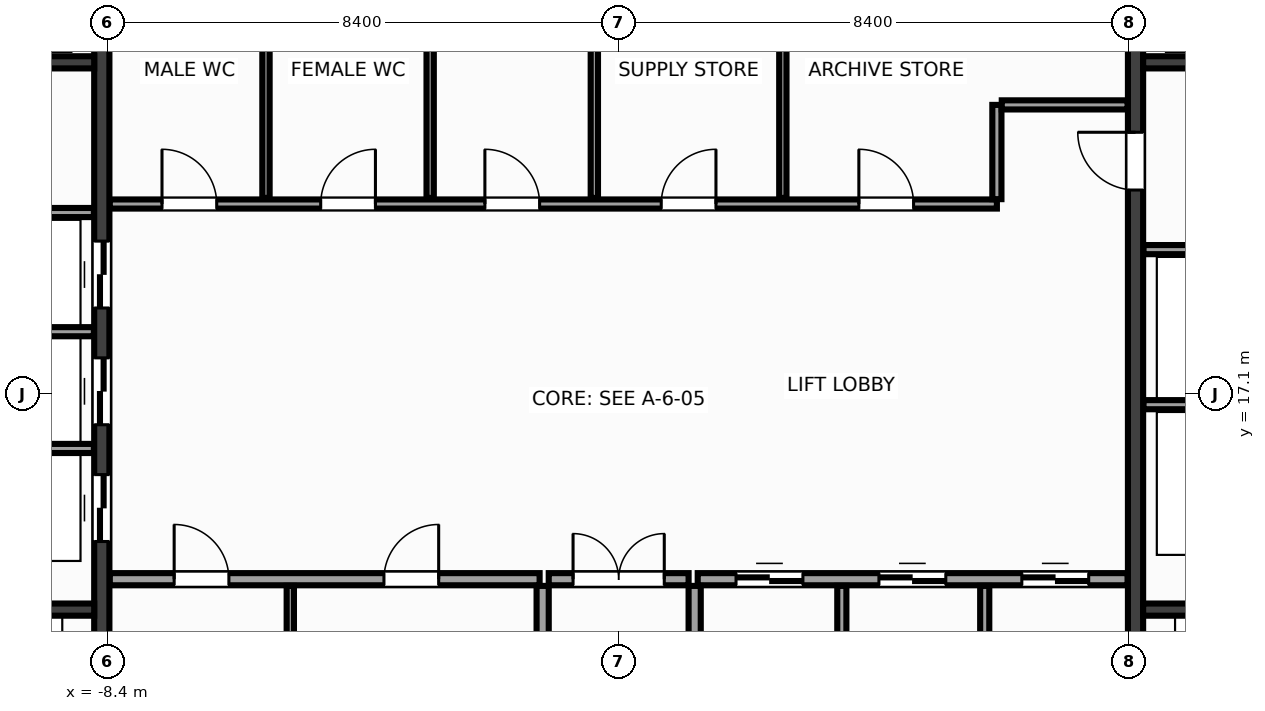
"""IFC4 building model, lengths in metres.
Left out: names, types, materials, properties, quantities, classifications, styles, units other than length and angle.
Written with IfcOpenShell. Run it as: python <this file> out.ifc"""

import sys

from ifc_helpers import new_model, si_unit, direction, frame, frame_2d, origin, place, context, subcontext, project, spatial, rectangle, extrude, source, transform, mapped, element, fill, save


model = new_model("IFC4")
c1 = context("Model", 3, precision=1e-05, world=origin(), true_north=direction((0.0, 1.0)))
c2 = subcontext(c1, "Body", "Model", "MODEL_VIEW")
j1 = project(units=[si_unit("LENGTHUNIT", "METRE"), si_unit("PLANEANGLEUNIT", "RADIAN")], contexts=[c1])
p1 = place(None, origin())
s1 = spatial("IfcSite", under=j1, at=p1, CompositionType="ELEMENT")
p2 = place(p1, origin())
s2 = spatial("IfcBuilding", under=s1, at=p2, CompositionType="ELEMENT")
p3 = place(p2, frame((0.0, 0.0, 142.4)))
s3 = spatial("IfcBuildingStorey", under=s2, at=p3, CompositionType="ELEMENT", Elevation=142.4)
m1 = source(origin(), c2, "Body", "SweptSolid", [
    extrude(rectangle(XDim=12.95, YDim=0.25, at=frame_2d((6.475, 0.0))), origin(), (0.0, 0.0, 1.0), 3.6),
])
p4 = place(p3, frame((-8.5, 10.525, 0.0), z_axis=(0.0, 0.0, 1.0), x_axis=(0.0, 1.0, 0.0)))
e1 = element("IfcWall", 1, at=p4, inside=s3, PredefinedType="SHEAR", context=c2, shape_type="MappedRepresentation", body=[
    mapped(m1, transform((0.0, 0.0, 0.0), x_axis=(1.0, 0.0, 0.0), y_axis=(0.0, 1.0, 0.0), z_axis=(0.0, 0.0, 1.0), scale=1.0)),
])
p5 = place(p4, frame((4.145, 0.0, 0.0)))
e2 = element("IfcOpeningElement", 2, at=p5, cuts=e1, PredefinedType="OPENING", context=c2, shape_type="SweptSolid", body=[
    extrude(rectangle(XDim=1.1, YDim=2.15, at=frame_2d((0.55, 1.075))), frame((0.0, 0.137, 0.0), z_axis=(0.0, -1.0, 0.0), x_axis=(1.0, 0.0, 0.0)), (0.0, 0.0, 1.0), 0.274),
])
p6 = place(p4, frame((6.065, 0.0, 0.0)))
e3 = element("IfcOpeningElement", 3, at=p6, cuts=e1, PredefinedType="OPENING", context=c2, shape_type="SweptSolid", body=[
    extrude(rectangle(XDim=1.1, YDim=2.15, at=frame_2d((0.55, 1.075))), frame((0.0, 0.137, 0.0), z_axis=(0.0, -1.0, 0.0), x_axis=(1.0, 0.0, 0.0)), (0.0, 0.0, 1.0), 0.274),
])
p7 = place(p4, frame((7.985, 0.0, 0.0)))
e4 = element("IfcOpeningElement", 4, at=p7, cuts=e1, PredefinedType="OPENING", context=c2, shape_type="SweptSolid", body=[
    extrude(rectangle(XDim=1.1, YDim=2.15, at=frame_2d((0.55, 1.075))), frame((0.0, 0.137, 0.0), z_axis=(0.0, -1.0, 0.0), x_axis=(1.0, 0.0, 0.0)), (0.0, 0.0, 1.0), 0.274),
])
p8 = place(p3, frame((8.5, 10.525, 0.0), z_axis=(0.0, 0.0, 1.0), x_axis=(0.0, 1.0, 0.0)))
e5 = element("IfcWall", 5, at=p8, inside=s3, PredefinedType="SHEAR", context=c2, shape_type="MappedRepresentation", body=[
    mapped(m1, transform((0.0, 0.0, 0.0), x_axis=(1.0, 0.0, 0.0), y_axis=(0.0, 1.0, 0.0), z_axis=(0.0, 0.0, 1.0), scale=1.0)),
])
p9 = place(p8, frame((9.925, 0.0, 0.0)))
e6 = element("IfcOpeningElement", 6, at=p9, cuts=e5, PredefinedType="OPENING", context=c2, shape_type="SweptSolid", body=[
    extrude(rectangle(XDim=0.95, YDim=2.15, at=frame_2d((0.475, 1.075))), frame((0.0, 0.137, 0.0), z_axis=(0.0, -1.0, 0.0), x_axis=(1.0, 0.0, 0.0)), (0.0, 0.0, 1.0), 0.274),
])
m2 = source(origin(), c2, "Body", "SweptSolid", [
    extrude(rectangle(XDim=2.825, YDim=0.2, at=frame_2d((1.413, 0.0))), origin(), (0.0, 0.0, 1.0), 3.6),
])
for number, where, z_axis, x_axis in (
    (7, (-11.45, 13.55, 0.0), (0.0, 0.0, 1.0), (1.0, 0.0, 0.0)),
    (8, (8.625, 13.55, 0.0), (0.0, 0.0, 1.0), (1.0, 0.0, 0.0)),
):
    element("IfcWall", number, at=place(p3, frame(where, z_axis=z_axis, x_axis=x_axis)), inside=s3, PredefinedType="SHEAR", context=c2, shape_type="MappedRepresentation", body=[
        mapped(m2, transform((0.0, 0.0, 0.0), x_axis=(1.0, 0.0, 0.0), y_axis=(0.0, 1.0, 0.0), z_axis=(0.0, 0.0, 1.0), scale=1.0)),
    ])
m3 = source(origin(), c2, "Body", "SweptSolid", [
    extrude(rectangle(XDim=3.02, YDim=0.2, at=frame_2d((1.51, 0.0))), origin(), (0.0, 0.0, 1.0), 3.6),
])
for number, where, z_axis, x_axis in (
    (9, (-11.645, 22.55, 0.0), (0.0, 0.0, 1.0), (1.0, 0.0, 0.0)),
    (10, (8.625, 22.55, 0.0), (0.0, 0.0, 1.0), (1.0, 0.0, 0.0)),
):
    element("IfcWall", number, at=place(p3, frame(where, z_axis=z_axis, x_axis=x_axis)), inside=s3, PredefinedType="SHEAR", context=c2, shape_type="MappedRepresentation", body=[
        mapped(m3, transform((0.0, 0.0, 0.0), x_axis=(1.0, 0.0, 0.0), y_axis=(0.0, 1.0, 0.0), z_axis=(0.0, 0.0, 1.0), scale=1.0)),
    ])
m4 = source(origin(), c2, "Body", "SweptSolid", [
    extrude(rectangle(XDim=3.01, YDim=0.15, at=frame_2d((1.505, 0.0))), origin(), (0.0, 0.0, 1.0), 3.38),
])
for number, where, z_axis, x_axis in (
    (11, (-11.64, 16.2, 0.0), (0.0, 0.0, 1.0), (1.0, 0.0, 0.0)),
    (12, (-11.64, 18.12, 0.0), (0.0, 0.0, 1.0), (1.0, 0.0, 0.0)),
    (13, (-11.64, 20.08, 0.0), (0.0, 0.0, 1.0), (1.0, 0.0, 0.0)),
    (14, (8.63, 16.92, 0.0), (0.0, 0.0, 1.0), (1.0, 0.0, 0.0)),
    (15, (8.63, 19.47, 0.0), (0.0, 0.0, 1.0), (1.0, 0.0, 0.0)),
):
    element("IfcWall", number, at=place(p3, frame(where, z_axis=z_axis, x_axis=x_axis)), inside=s3, PredefinedType="PARTITIONING", context=c2, shape_type="MappedRepresentation", body=[
        mapped(m4, transform((0.0, 0.0, 0.0), x_axis=(1.0, 0.0, 0.0), y_axis=(0.0, 1.0, 0.0), z_axis=(0.0, 0.0, 1.0), scale=1.0)),
    ])
m5 = source(origin(), c2, "Body", "SweptSolid", [
    extrude(rectangle(XDim=7.07, YDim=0.2, at=frame_2d((3.535, 0.0))), origin(), (0.0, 0.0, 1.0), 3.38),
])
p10 = place(p3, frame((-8.37, 14.05, 0.0), z_axis=(0.0, 0.0, 1.0), x_axis=(1.0, 0.0, 0.0)))
e16 = element("IfcWall", 16, at=p10, inside=s3, PredefinedType="PARTITIONING", context=c2, shape_type="MappedRepresentation", body=[
    mapped(m5, transform((0.0, 0.0, 0.0), x_axis=(1.0, 0.0, 0.0), y_axis=(0.0, 1.0, 0.0), z_axis=(0.0, 0.0, 1.0), scale=1.0)),
])
p11 = place(p10, frame((1.06, 0.0, 0.0)))
e17 = element("IfcOpeningElement", 17, at=p11, cuts=e16, PredefinedType="OPENING", context=c2, shape_type="SweptSolid", body=[
    extrude(rectangle(XDim=0.9, YDim=2.15, at=frame_2d((0.45, 1.075))), frame((0.0, 0.112, 0.0), z_axis=(0.0, -1.0, 0.0), x_axis=(1.0, 0.0, 0.0)), (0.0, 0.0, 1.0), 0.224),
])
p12 = place(p10, frame((4.51, 0.0, 0.0)))
e18 = element("IfcOpeningElement", 18, at=p12, cuts=e16, PredefinedType="OPENING", context=c2, shape_type="SweptSolid", body=[
    extrude(rectangle(XDim=0.9, YDim=2.15, at=frame_2d((0.45, 1.075))), frame((0.0, 0.112, 0.0), z_axis=(0.0, -1.0, 0.0), x_axis=(1.0, 0.0, 0.0)), (0.0, 0.0, 1.0), 0.224),
])
p13 = place(p3, frame((1.3, 14.05, 0.0), z_axis=(0.0, 0.0, 1.0), x_axis=(1.0, 0.0, 0.0)))
e19 = element("IfcWall", 19, at=p13, inside=s3, PredefinedType="PARTITIONING", context=c2, shape_type="MappedRepresentation", body=[
    mapped(m5, transform((0.0, 0.0, 0.0), x_axis=(1.0, 0.0, 0.0), y_axis=(0.0, 1.0, 0.0), z_axis=(0.0, 0.0, 1.0), scale=1.0)),
])
p14 = place(p13, frame((0.63, 0.0, 0.0)))
e20 = element("IfcOpeningElement", 20, at=p14, cuts=e19, PredefinedType="OPENING", context=c2, shape_type="SweptSolid", body=[
    extrude(rectangle(XDim=1.1, YDim=2.15, at=frame_2d((0.55, 1.075))), frame((0.0, 0.112, 0.0), z_axis=(0.0, -1.0, 0.0), x_axis=(1.0, 0.0, 0.0)), (0.0, 0.0, 1.0), 0.224),
])
p15 = place(p13, frame((2.98, 0.0, 0.0)))
e21 = element("IfcOpeningElement", 21, at=p15, cuts=e19, PredefinedType="OPENING", context=c2, shape_type="SweptSolid", body=[
    extrude(rectangle(XDim=1.1, YDim=2.15, at=frame_2d((0.55, 1.075))), frame((0.0, 0.112, 0.0), z_axis=(0.0, -1.0, 0.0), x_axis=(1.0, 0.0, 0.0)), (0.0, 0.0, 1.0), 0.224),
])
p16 = place(p13, frame((5.33, 0.0, 0.0)))
e22 = element("IfcOpeningElement", 22, at=p16, cuts=e19, PredefinedType="OPENING", context=c2, shape_type="SweptSolid", body=[
    extrude(rectangle(XDim=1.1, YDim=2.15, at=frame_2d((0.55, 1.075))), frame((0.0, 0.112, 0.0), z_axis=(0.0, -1.0, 0.0), x_axis=(1.0, 0.0, 0.0)), (0.0, 0.0, 1.0), 0.224),
])
m6 = source(origin(), c2, "Body", "SweptSolid", [
    extrude(rectangle(XDim=3.415, YDim=0.2, at=frame_2d((1.708, 0.0))), origin(), (0.0, 0.0, 1.0), 3.38),
])
for number, where, z_axis, x_axis in (
    (23, (-1.25, 10.525, 0.0), (0.0, 0.0, 1.0), (0.0, 1.0, 0.0)),
    (24, (1.25, 10.525, 0.0), (0.0, 0.0, 1.0), (0.0, 1.0, 0.0)),
):
    element("IfcWall", number, at=place(p3, frame(where, z_axis=z_axis, x_axis=x_axis)), inside=s3, PredefinedType="PARTITIONING", context=c2, shape_type="MappedRepresentation", body=[
        mapped(m6, transform((0.0, 0.0, 0.0), x_axis=(1.0, 0.0, 0.0), y_axis=(0.0, 1.0, 0.0), z_axis=(0.0, 0.0, 1.0), scale=1.0)),
    ])
m7 = source(origin(), c2, "Body", "SweptSolid", [
    extrude(rectangle(XDim=2.3, YDim=0.2, at=frame_2d((1.15, 0.0))), origin(), (0.0, 0.0, 1.0), 3.38),
])
p17 = place(p3, frame((-1.15, 14.05, 0.0), z_axis=(0.0, 0.0, 1.0), x_axis=(1.0, 0.0, 0.0)))
e25 = element("IfcWall", 25, at=p17, inside=s3, PredefinedType="PARTITIONING", context=c2, shape_type="MappedRepresentation", body=[
    mapped(m7, transform((0.0, 0.0, 0.0), x_axis=(1.0, 0.0, 0.0), y_axis=(0.0, 1.0, 0.0), z_axis=(0.0, 0.0, 1.0), scale=1.0)),
])
p18 = place(p17, frame((0.4, 0.0, 0.0)))
e26 = element("IfcOpeningElement", 26, at=p18, cuts=e25, PredefinedType="OPENING", context=c2, shape_type="SweptSolid", body=[
    extrude(rectangle(XDim=1.5, YDim=2.2, at=frame_2d((0.75, 1.1))), frame((0.0, 0.112, 0.0), z_axis=(0.0, -1.0, 0.0), x_axis=(1.0, 0.0, 0.0)), (0.0, 0.0, 1.0), 0.224),
])
m8 = source(origin(), c2, "Body", "SweptSolid", [
    extrude(rectangle(XDim=14.59, YDim=0.15, at=frame_2d((7.295, 0.0))), origin(), (0.0, 0.0, 1.0), 3.38),
])
p19 = place(p3, frame((-8.37, 20.22, 0.0), z_axis=(0.0, 0.0, 1.0), x_axis=(1.0, 0.0, 0.0)))
e27 = element("IfcWall", 27, at=p19, inside=s3, PredefinedType="PARTITIONING", context=c2, shape_type="MappedRepresentation", body=[
    mapped(m8, transform((0.0, 0.0, 0.0), x_axis=(1.0, 0.0, 0.0), y_axis=(0.0, 1.0, 0.0), z_axis=(0.0, 0.0, 1.0), scale=1.0)),
])
p20 = place(p19, frame((0.86, 0.0, 0.0)))
e28 = element("IfcOpeningElement", 28, at=p20, cuts=e27, PredefinedType="OPENING", context=c2, shape_type="SweptSolid", body=[
    extrude(rectangle(XDim=0.9, YDim=2.15, at=frame_2d((0.45, 1.075))), frame((0.0, 0.087, 0.0), z_axis=(0.0, -1.0, 0.0), x_axis=(1.0, 0.0, 0.0)), (0.0, 0.0, 1.0), 0.174),
])
p21 = place(p19, frame((3.47, 0.0, 0.0)))
e29 = element("IfcOpeningElement", 29, at=p21, cuts=e27, PredefinedType="OPENING", context=c2, shape_type="SweptSolid", body=[
    extrude(rectangle(XDim=0.9, YDim=2.15, at=frame_2d((0.45, 1.075))), frame((0.0, 0.087, 0.0), z_axis=(0.0, -1.0, 0.0), x_axis=(1.0, 0.0, 0.0)), (0.0, 0.0, 1.0), 0.174),
])
p22 = place(p19, frame((6.17, 0.0, 0.0)))
e30 = element("IfcOpeningElement", 30, at=p22, cuts=e27, PredefinedType="OPENING", context=c2, shape_type="SweptSolid", body=[
    extrude(rectangle(XDim=0.9, YDim=2.15, at=frame_2d((0.45, 1.075))), frame((0.0, 0.087, 0.0), z_axis=(0.0, -1.0, 0.0), x_axis=(1.0, 0.0, 0.0)), (0.0, 0.0, 1.0), 0.174),
])
p23 = place(p19, frame((9.07, 0.0, 0.0)))
e31 = element("IfcOpeningElement", 31, at=p23, cuts=e27, PredefinedType="OPENING", context=c2, shape_type="SweptSolid", body=[
    extrude(rectangle(XDim=0.9, YDim=2.15, at=frame_2d((0.45, 1.075))), frame((0.0, 0.087, 0.0), z_axis=(0.0, -1.0, 0.0), x_axis=(1.0, 0.0, 0.0)), (0.0, 0.0, 1.0), 0.174),
])
p24 = place(p19, frame((12.32, 0.0, 0.0)))
e32 = element("IfcOpeningElement", 32, at=p24, cuts=e27, PredefinedType="OPENING", context=c2, shape_type="SweptSolid", body=[
    extrude(rectangle(XDim=0.9, YDim=2.15, at=frame_2d((0.45, 1.075))), frame((0.0, 0.087, 0.0), z_axis=(0.0, -1.0, 0.0), x_axis=(1.0, 0.0, 0.0)), (0.0, 0.0, 1.0), 0.174),
])
m9 = source(origin(), c2, "Body", "SweptSolid", [
    extrude(rectangle(XDim=1.55, YDim=0.15, at=frame_2d((0.775, 0.0))), origin(), (0.0, 0.0, 1.0), 3.38),
])
p25 = place(p3, frame((6.22, 20.3, 0.0), z_axis=(0.0, 0.0, 1.0), x_axis=(0.0, 1.0, 0.0)))
e33 = element("IfcWall", 33, at=p25, inside=s3, PredefinedType="PARTITIONING", context=c2, shape_type="MappedRepresentation", body=[
    mapped(m9, transform((0.0, 0.0, 0.0), x_axis=(1.0, 0.0, 0.0), y_axis=(0.0, 1.0, 0.0), z_axis=(0.0, 0.0, 1.0), scale=1.0)),
])
m10 = source(origin(), c2, "Body", "SweptSolid", [
    extrude(rectangle(XDim=2.07, YDim=0.15, at=frame_2d((1.035, 0.0))), origin(), (0.0, 0.0, 1.0), 3.38),
])
p26 = place(p3, frame((6.3, 21.85, 0.0), z_axis=(0.0, 0.0, 1.0), x_axis=(1.0, 0.0, 0.0)))
e34 = element("IfcWall", 34, at=p26, inside=s3, PredefinedType="PARTITIONING", context=c2, shape_type="MappedRepresentation", body=[
    mapped(m10, transform((0.0, 0.0, 0.0), x_axis=(1.0, 0.0, 0.0), y_axis=(0.0, 1.0, 0.0), z_axis=(0.0, 0.0, 1.0), scale=1.0)),
])
m11 = source(origin(), c2, "Body", "SweptSolid", [
    extrude(rectangle(XDim=3.415, YDim=0.12, at=frame_2d((1.708, 0.0))), origin(), (0.0, 0.0, 1.0), 3.38),
])
p27 = place(p3, frame((-5.4, 10.525, 0.0), z_axis=(0.0, 0.0, 1.0), x_axis=(0.0, 1.0, 0.0)))
e35 = element("IfcWall", 35, at=p27, inside=s3, PredefinedType="PARTITIONING", context=c2, shape_type="MappedRepresentation", body=[
    mapped(m11, transform((0.0, 0.0, 0.0), x_axis=(1.0, 0.0, 0.0), y_axis=(0.0, 1.0, 0.0), z_axis=(0.0, 0.0, 1.0), scale=1.0)),
])
m12 = source(origin(), c2, "Body", "SweptSolid", [
    extrude(rectangle(XDim=3.415, YDim=0.15, at=frame_2d((1.708, 0.0))), origin(), (0.0, 0.0, 1.0), 3.38),
])
for number, where, z_axis, x_axis in (
    (36, (3.67, 10.525, 0.0), (0.0, 0.0, 1.0), (0.0, 1.0, 0.0)),
    (37, (6.02, 10.525, 0.0), (0.0, 0.0, 1.0), (0.0, 1.0, 0.0)),
):
    element("IfcWall", number, at=place(p3, frame(where, z_axis=z_axis, x_axis=x_axis)), inside=s3, PredefinedType="PARTITIONING", context=c2, shape_type="MappedRepresentation", body=[
        mapped(m12, transform((0.0, 0.0, 0.0), x_axis=(1.0, 0.0, 0.0), y_axis=(0.0, 1.0, 0.0), z_axis=(0.0, 0.0, 1.0), scale=1.0)),
    ])
m13 = source(origin(), c2, "Body", "SweptSolid", [
    extrude(rectangle(XDim=3.115, YDim=0.12, at=frame_2d((1.558, 0.0))), origin(), (0.0, 0.0, 1.0), 3.38),
])
for number, where, z_axis, x_axis in (
    (38, (-5.8, 20.32, 0.0), (0.0, 0.0, 1.0), (0.0, 1.0, 0.0)),
    (39, (-3.1, 20.32, 0.0), (0.0, 0.0, 1.0), (0.0, 1.0, 0.0)),
    (40, (-0.4, 20.32, 0.0), (0.0, 0.0, 1.0), (0.0, 1.0, 0.0)),
    (41, (2.7, 20.32, 0.0), (0.0, 0.0, 1.0), (0.0, 1.0, 0.0)),
):
    element("IfcWall", number, at=place(p3, frame(where, z_axis=z_axis, x_axis=x_axis)), inside=s3, PredefinedType="PARTITIONING", context=c2, shape_type="MappedRepresentation", body=[
        mapped(m13, transform((0.0, 0.0, 0.0), x_axis=(1.0, 0.0, 0.0), y_axis=(0.0, 1.0, 0.0), z_axis=(0.0, 0.0, 1.0), scale=1.0)),
    ])
m14 = source(origin(), c2, "Body", "SweptSolid", [
    extrude(rectangle(XDim=1.1, YDim=2.15, at=frame_2d((0.55, 1.075))), frame((0.0, 0.025, 0.0), z_axis=(0.0, -1.0, 0.0), x_axis=(1.0, 0.0, 0.0)), (0.0, 0.0, 1.0), 0.05),
])
p28 = place(p5, origin())
e42 = element("IfcDoor", 42, at=p28, inside=s3, OperationType="DOUBLE_DOOR_SLIDING", PredefinedType="DOOR", context=c2, shape_type="MappedRepresentation", body=[
    mapped(m14, transform((0.0, 0.0, 0.0), x_axis=(1.0, 0.0, 0.0), y_axis=(0.0, 1.0, 0.0), z_axis=(0.0, 0.0, 1.0), scale=1.0)),
])
fill(e2, e42)
p29 = place(p6, origin())
e43 = element("IfcDoor", 43, at=p29, inside=s3, OperationType="DOUBLE_DOOR_SLIDING", PredefinedType="DOOR", context=c2, shape_type="MappedRepresentation", body=[
    mapped(m14, transform((0.0, 0.0, 0.0), x_axis=(1.0, 0.0, 0.0), y_axis=(0.0, 1.0, 0.0), z_axis=(0.0, 0.0, 1.0), scale=1.0)),
])
fill(e3, e43)
p30 = place(p7, origin())
e44 = element("IfcDoor", 44, at=p30, inside=s3, OperationType="DOUBLE_DOOR_SLIDING", PredefinedType="DOOR", context=c2, shape_type="MappedRepresentation", body=[
    mapped(m14, transform((0.0, 0.0, 0.0), x_axis=(1.0, 0.0, 0.0), y_axis=(0.0, 1.0, 0.0), z_axis=(0.0, 0.0, 1.0), scale=1.0)),
])
fill(e4, e44)
m15 = source(origin(), c2, "Body", "SweptSolid", [
    extrude(rectangle(XDim=0.95, YDim=2.15, at=frame_2d((0.475, 1.075))), frame((0.0, 0.025, 0.0), z_axis=(0.0, -1.0, 0.0), x_axis=(1.0, 0.0, 0.0)), (0.0, 0.0, 1.0), 0.05),
])
p31 = place(p9, origin())
e45 = element("IfcDoor", 45, at=p31, inside=s3, OperationType="SINGLE_SWING_RIGHT", PredefinedType="DOOR", context=c2, shape_type="MappedRepresentation", body=[
    mapped(m15, transform((0.0, 0.0, 0.0), x_axis=(1.0, 0.0, 0.0), y_axis=(0.0, 1.0, 0.0), z_axis=(0.0, 0.0, 1.0), scale=1.0)),
])
fill(e6, e45)
m16 = source(origin(), c2, "Body", "SweptSolid", [
    extrude(rectangle(XDim=0.9, YDim=2.15, at=frame_2d((0.45, 1.075))), frame((0.0, 0.025, 0.0), z_axis=(0.0, -1.0, 0.0), x_axis=(1.0, 0.0, 0.0)), (0.0, 0.0, 1.0), 0.05),
])
p32 = place(p11, origin())
e46 = element("IfcDoor", 46, at=p32, inside=s3, OperationType="SINGLE_SWING_LEFT", PredefinedType="DOOR", context=c2, shape_type="MappedRepresentation", body=[
    mapped(m16, transform((0.0, 0.0, 0.0), x_axis=(1.0, 0.0, 0.0), y_axis=(0.0, 1.0, 0.0), z_axis=(0.0, 0.0, 1.0), scale=1.0)),
])
fill(e17, e46)
p33 = place(p12, origin())
e47 = element("IfcDoor", 47, at=p33, inside=s3, OperationType="SINGLE_SWING_RIGHT", PredefinedType="DOOR", context=c2, shape_type="MappedRepresentation", body=[
    mapped(m16, transform((0.0, 0.0, 0.0), x_axis=(1.0, 0.0, 0.0), y_axis=(0.0, 1.0, 0.0), z_axis=(0.0, 0.0, 1.0), scale=1.0)),
])
fill(e18, e47)
p34 = place(p14, origin())
e48 = element("IfcDoor", 48, at=p34, inside=s3, OperationType="DOUBLE_DOOR_SLIDING", PredefinedType="DOOR", context=c2, shape_type="MappedRepresentation", body=[
    mapped(m14, transform((0.0, 0.0, 0.0), x_axis=(1.0, 0.0, 0.0), y_axis=(0.0, 1.0, 0.0), z_axis=(0.0, 0.0, 1.0), scale=1.0)),
])
fill(e20, e48)
p35 = place(p15, origin())
e49 = element("IfcDoor", 49, at=p35, inside=s3, OperationType="DOUBLE_DOOR_SLIDING", PredefinedType="DOOR", context=c2, shape_type="MappedRepresentation", body=[
    mapped(m14, transform((0.0, 0.0, 0.0), x_axis=(1.0, 0.0, 0.0), y_axis=(0.0, 1.0, 0.0), z_axis=(0.0, 0.0, 1.0), scale=1.0)),
])
fill(e21, e49)
p36 = place(p16, origin())
e50 = element("IfcDoor", 50, at=p36, inside=s3, OperationType="DOUBLE_DOOR_SLIDING", PredefinedType="DOOR", context=c2, shape_type="MappedRepresentation", body=[
    mapped(m14, transform((0.0, 0.0, 0.0), x_axis=(1.0, 0.0, 0.0), y_axis=(0.0, 1.0, 0.0), z_axis=(0.0, 0.0, 1.0), scale=1.0)),
])
fill(e22, e50)
m17 = source(origin(), c2, "Body", "SweptSolid", [
    extrude(rectangle(XDim=1.5, YDim=2.2, at=frame_2d((0.75, 1.1))), frame((0.0, 0.025, 0.0), z_axis=(0.0, -1.0, 0.0), x_axis=(1.0, 0.0, 0.0)), (0.0, 0.0, 1.0), 0.05),
])
p37 = place(p18, origin())
e51 = element("IfcDoor", 51, at=p37, inside=s3, OperationType="DOUBLE_DOOR_SINGLE_SWING", PredefinedType="DOOR", context=c2, shape_type="MappedRepresentation", body=[
    mapped(m17, transform((0.0, 0.0, 0.0), x_axis=(1.0, 0.0, 0.0), y_axis=(0.0, 1.0, 0.0), z_axis=(0.0, 0.0, 1.0), scale=1.0)),
])
fill(e26, e51)
p38 = place(p20, origin())
e52 = element("IfcDoor", 52, at=p38, inside=s3, OperationType="SINGLE_SWING_LEFT", PredefinedType="DOOR", context=c2, shape_type="MappedRepresentation", body=[
    mapped(m16, transform((0.0, 0.0, 0.0), x_axis=(1.0, 0.0, 0.0), y_axis=(0.0, 1.0, 0.0), z_axis=(0.0, 0.0, 1.0), scale=1.0)),
])
fill(e28, e52)
p39 = place(p21, origin())
e53 = element("IfcDoor", 53, at=p39, inside=s3, OperationType="SINGLE_SWING_RIGHT", PredefinedType="DOOR", context=c2, shape_type="MappedRepresentation", body=[
    mapped(m16, transform((0.0, 0.0, 0.0), x_axis=(1.0, 0.0, 0.0), y_axis=(0.0, 1.0, 0.0), z_axis=(0.0, 0.0, 1.0), scale=1.0)),
])
fill(e29, e53)
p40 = place(p22, origin())
e54 = element("IfcDoor", 54, at=p40, inside=s3, OperationType="SINGLE_SWING_LEFT", PredefinedType="DOOR", context=c2, shape_type="MappedRepresentation", body=[
    mapped(m16, transform((0.0, 0.0, 0.0), x_axis=(1.0, 0.0, 0.0), y_axis=(0.0, 1.0, 0.0), z_axis=(0.0, 0.0, 1.0), scale=1.0)),
])
fill(e30, e54)
p41 = place(p23, origin())
e55 = element("IfcDoor", 55, at=p41, inside=s3, OperationType="SINGLE_SWING_RIGHT", PredefinedType="DOOR", context=c2, shape_type="MappedRepresentation", body=[
    mapped(m16, transform((0.0, 0.0, 0.0), x_axis=(1.0, 0.0, 0.0), y_axis=(0.0, 1.0, 0.0), z_axis=(0.0, 0.0, 1.0), scale=1.0)),
])
fill(e31, e55)
p42 = place(p24, origin())
e56 = element("IfcDoor", 56, at=p42, inside=s3, OperationType="SINGLE_SWING_LEFT", PredefinedType="DOOR", context=c2, shape_type="MappedRepresentation", body=[
    mapped(m16, transform((0.0, 0.0, 0.0), x_axis=(1.0, 0.0, 0.0), y_axis=(0.0, 1.0, 0.0), z_axis=(0.0, 0.0, 1.0), scale=1.0)),
])
fill(e32, e56)
save(model, sys.argv[1])
